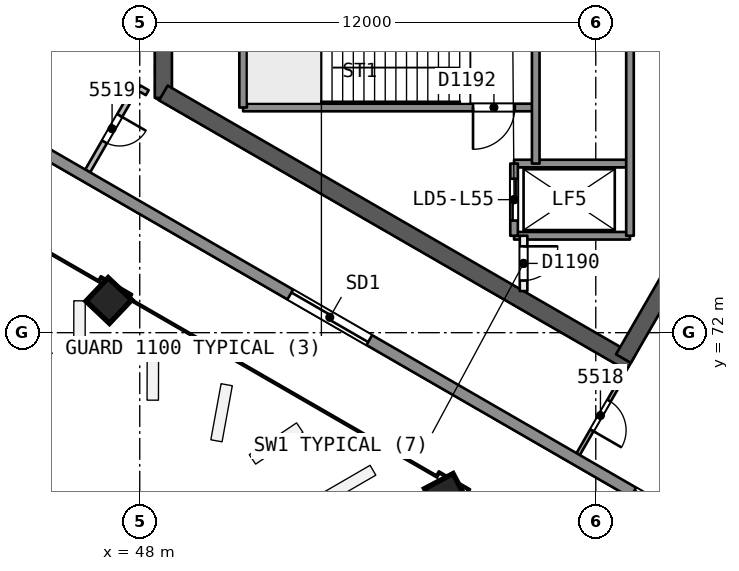
"""IFC4 building model, lengths in metres.
Left out: names, types, materials, properties, quantities, classifications, styles, units other than length and angle.
Written with IfcOpenShell. Run it as: python <this file> out.ifc"""

import sys

from ifc_helpers import new_model, si_unit, direction, frame, frame_2d, origin, origin_2d, place, context, subcontext, project, spatial, rectangle, extrude, element, fill, save


model = new_model("IFC4")
c1 = context("Model", 3, precision=1e-05, world=origin(), true_north=direction((0.0, 1.0)))
c2 = subcontext(c1, "Body", "Model", "MODEL_VIEW")
j1 = project(units=[si_unit("LENGTHUNIT", "METRE"), si_unit("PLANEANGLEUNIT", "RADIAN")], contexts=[c1])
p1 = place(None, origin())
s1 = spatial("IfcSite", under=j1, at=p1, CompositionType="ELEMENT")
p2 = place(p1, origin())
s2 = spatial("IfcBuilding", under=s1, at=p2, CompositionType="ELEMENT")
p3 = place(p2, frame((0.0, 0.0, 224.3)))
s3 = spatial("IfcBuildingStorey", under=s2, at=p3, CompositionType="ELEMENT", Elevation=224.3)
p4 = place(p3, frame((48.622, 81.693, 0.0), z_axis=(0.0, 0.0, 1.0), x_axis=(0.0, -1.0, 0.0)))
e1 = element("IfcWall", 1, at=p4, inside=s3, PredefinedType="SHEAR", context=c2, shape_type="SweptSolid", body=[
    extrude(rectangle(XDim=3.515, YDim=0.45, at=frame_2d((1.758, 0.0))), origin(), (0.0, 0.0, 1.0), 3.7),
])
p5 = place(p3, frame((48.622, 78.307, 0.0), z_axis=(0.0, 0.0, 1.0), x_axis=(0.86602701116, -0.499997215934, 0.0)))
e2 = element("IfcWall", 2, at=p5, inside=s3, PredefinedType="SHEAR", context=c2, shape_type="SweptSolid", body=[
    extrude(rectangle(XDim=14.204, YDim=0.45, at=frame_2d((7.102, 0.0))), origin(), (0.0, 0.0, 1.0), 3.7),
])
p6 = place(p3, frame((60.728, 71.318, 0.0), z_axis=(0.0, 0.0, 1.0), x_axis=(0.500012416173, 0.866018235185, 0.0)))
e3 = element("IfcWall", 3, at=p6, inside=s3, PredefinedType="SHEAR", context=c2, shape_type="SweptSolid", body=[
    extrude(rectangle(XDim=10.155, YDim=0.45, at=frame_2d((5.078, 0.0))), origin(), (0.0, 0.0, 1.0), 3.7),
])
p7 = place(p6, frame((8.005, 0.0, 0.0)))
e4 = element("IfcOpeningElement", 4, at=p7, cuts=e3, PredefinedType="OPENING", context=c2, shape_type="SweptSolid", body=[
    extrude(rectangle(XDim=1.2, YDim=2.1, at=frame_2d((0.6, 1.05))), frame((0.0, 0.235, 0.0), z_axis=(0.0, -1.0, 0.0), x_axis=(1.0, 0.0, 0.0)), (0.0, 0.0, 1.0), 0.471),
])
p8 = place(p3, frame((47.152, 72.837, 0.0), z_axis=(0.02855911485, 0.006793507689, 0.999569019734), x_axis=(-0.865318766308, 0.500768301983, 0.021319953197)))
e5 = element("IfcColumn", 5, at=p8, inside=s3, PredefinedType="COLUMN", context=c2, shape_type="SweptSolid", body=[
    extrude(rectangle(XDim=0.85, YDim=0.85, at=origin_2d()), origin(), (0.0, 0.0, 1.0), 3.702),
])
p9 = place(p3, frame((56.044, 67.703, 0.0), z_axis=(0.019328501455, 0.012204002625, 0.999738701537), x_axis=(-0.866909244433, 0.49835164734, 0.010676961654)))
e6 = element("IfcColumn", 6, at=p9, inside=s3, PredefinedType="COLUMN", context=c2, shape_type="SweptSolid", body=[
    extrude(rectangle(XDim=0.85, YDim=0.85, at=origin_2d()), origin(), (0.0, 0.0, 1.0), 3.701),
])
p10 = place(p3, frame((60.71, 70.838, 0.0), z_axis=(0.0, 0.0, 1.0), x_axis=(-0.499950341091, -0.86605407247, 0.0)))
e7 = element("IfcWall", 7, at=p10, inside=s3, PredefinedType="PARTITIONING", context=c2, shape_type="SweptSolid", body=[
    extrude(rectangle(XDim=2.349, YDim=0.1, at=frame_2d((1.175, 0.0))), origin(), (0.0, 0.0, 1.0), 3.3),
])
p11 = place(p10, frame((0.725, 0.0, 0.0)))
e8 = element("IfcOpeningElement", 8, at=p11, cuts=e7, PredefinedType="OPENING", context=c2, shape_type="SweptSolid", body=[
    extrude(rectangle(XDim=0.9, YDim=2.1, at=frame_2d((0.45, 1.05))), frame((0.0, 0.061, 0.0), z_axis=(0.0, -1.0, 0.0), x_axis=(1.0, 0.0, 0.0)), (0.0, 0.0, 1.0), 0.121),
])
p12 = place(p3, frame((48.198, 78.314, 0.0), z_axis=(0.0, 0.0, 1.0), x_axis=(-0.866054481515, 0.499949632511, 0.0)))
e9 = element("IfcWall", 9, at=p12, inside=s3, PredefinedType="PARTITIONING", context=c2, shape_type="SweptSolid", body=[
    extrude(rectangle(XDim=0.248, YDim=0.15, at=frame_2d((0.124, 0.0))), origin(), (0.0, 0.0, 1.0), 3.3),
])
p13 = place(p3, frame((47.914, 78.478, 0.0), z_axis=(0.0, 0.0, 1.0), x_axis=(-0.50000507078, -0.866022476149, 0.0)))
e10 = element("IfcWall", 10, at=p13, inside=s3, PredefinedType="PARTITIONING", context=c2, shape_type="SweptSolid", body=[
    extrude(rectangle(XDim=2.567, YDim=0.15, at=frame_2d((1.284, 0.0))), origin(), (0.0, 0.0, 1.0), 3.3),
])
p14 = place(p13, frame((0.884, 0.0, 0.0)))
e11 = element("IfcOpeningElement", 11, at=p14, cuts=e10, PredefinedType="OPENING", context=c2, shape_type="SweptSolid", body=[
    extrude(rectangle(XDim=0.8, YDim=2.1, at=frame_2d((0.4, 1.05))), frame((0.0, 0.085, 0.0), z_axis=(0.0, -1.0, 0.0), x_axis=(1.0, 0.0, 0.0)), (0.0, 0.0, 1.0), 0.171),
])
p15 = place(p3, frame((88.099, 52.141, 0.0), z_axis=(0.0, 0.0, 1.0), x_axis=(-0.86602584856, 0.499999229625, 0.0)))
e12 = element("IfcWall", 12, at=p15, inside=s3, PredefinedType="SOLIDWALL", context=c2, shape_type="SweptSolid", body=[
    extrude(rectangle(XDim=50.547, YDim=0.3, at=frame_2d((25.274, 0.0))), origin(), (0.0, 0.0, 1.0), 3.3),
])
p16 = place(p15, frame((23.294, 0.0, 0.0)))
e13 = element("IfcOpeningElement", 13, at=p16, cuts=e12, PredefinedType="OPENING", context=c2, shape_type="SweptSolid", body=[
    extrude(rectangle(XDim=2.4, YDim=2.4, at=frame_2d((1.2, 1.2))), frame((0.0, 0.161, 0.0), z_axis=(0.0, -1.0, 0.0), x_axis=(1.0, 0.0, 0.0)), (0.0, 0.0, 1.0), 0.321),
])
p17 = place(p15, frame((28.906, 0.0, 0.0)))
e14 = element("IfcOpeningElement", 14, at=p17, cuts=e12, PredefinedType="OPENING", context=c2, shape_type="SweptSolid", body=[
    extrude(rectangle(XDim=2.4, YDim=2.4, at=frame_2d((1.2, 1.2))), frame((0.0, 0.161, 0.0), z_axis=(0.0, -1.0, 0.0), x_axis=(1.0, 0.0, 0.0)), (0.0, 0.0, 1.0), 0.321),
])
p18 = place(p15, frame((39.328, 0.0, 0.0)))
e15 = element("IfcOpeningElement", 15, at=p18, cuts=e12, PredefinedType="OPENING", context=c2, shape_type="SweptSolid", body=[
    extrude(rectangle(XDim=2.4, YDim=2.4, at=frame_2d((1.2, 1.2))), frame((0.0, 0.161, 0.0), z_axis=(0.0, -1.0, 0.0), x_axis=(1.0, 0.0, 0.0)), (0.0, 0.0, 1.0), 0.321),
])
p19 = place(p15, frame((18.462, 0.0, 0.0)))
e16 = element("IfcOpeningElement", 16, at=p19, cuts=e12, PredefinedType="OPENING", context=c2, shape_type="SweptSolid", body=[
    extrude(rectangle(XDim=2.4, YDim=2.4, at=frame_2d((1.2, 1.2))), frame((0.0, 0.161, 0.0), z_axis=(0.0, -1.0, 0.0), x_axis=(1.0, 0.0, 0.0)), (0.0, 0.0, 1.0), 0.321),
])
p20 = place(p15, frame((8.771, 0.0, 0.0)))
e17 = element("IfcOpeningElement", 17, at=p20, cuts=e12, PredefinedType="OPENING", context=c2, shape_type="SweptSolid", body=[
    extrude(rectangle(XDim=2.4, YDim=2.4, at=frame_2d((1.2, 1.2))), frame((0.0, 0.161, 0.0), z_axis=(0.0, -1.0, 0.0), x_axis=(1.0, 0.0, 0.0)), (0.0, 0.0, 1.0), 0.321),
])
p21 = place(p3, frame((58.42, 77.925, 0.0), z_axis=(0.0, 0.0, 1.0), x_axis=(-1.0, 0.0, 0.0)))
e18 = element("IfcWall", 18, at=p21, inside=s3, PredefinedType="SOLIDWALL", context=c2, shape_type="SweptSolid", body=[
    extrude(rectangle(XDim=7.7, YDim=0.2, at=frame_2d((3.85, 0.0))), origin(), (0.0, 0.0, 1.0), 3.3),
])
p22 = place(p21, frame((0.55, 0.0, 0.0)))
e19 = element("IfcOpeningElement", 19, at=p22, cuts=e18, PredefinedType="OPENING", context=c2, shape_type="SweptSolid", body=[
    extrude(rectangle(XDim=1.1, YDim=2.1, at=frame_2d((0.55, 1.05))), frame((0.0, 0.11, 0.0), z_axis=(0.0, -1.0, 0.0), x_axis=(1.0, 0.0, 0.0)), (0.0, 0.0, 1.0), 0.221),
])
for number, where, z_axis, x_axis in (
    (20, (60.9, 76.45, 0.0), (0.0, 0.0, 1.0), (-1.0, 0.0, 0.0)),
    (21, (60.9, 74.55, 0.0), (0.0, 0.0, 1.0), (-1.0, 0.0, 0.0)),
):
    element("IfcWall", number, at=place(p3, frame(where, z_axis=z_axis, x_axis=x_axis)), inside=s3, PredefinedType="SOLIDWALL", context=c2, shape_type="SweptSolid", body=[
        extrude(rectangle(XDim=3.05, YDim=0.2, at=frame_2d((1.525, 0.0))), origin(), (0.0, 0.0, 1.0), 3.3),
    ])
p23 = place(p3, frame((60.9, 85.45, 0.0), z_axis=(0.0, 0.0, 1.0), x_axis=(0.0, -1.0, 0.0)))
e22 = element("IfcWall", 22, at=p23, inside=s3, PredefinedType="SOLIDWALL", context=c2, shape_type="SweptSolid", body=[
    extrude(rectangle(XDim=10.9, YDim=0.2, at=frame_2d((5.45, 0.0))), origin(), (0.0, 0.0, 1.0), 3.3),
])
p24 = place(p23, frame((4.0, 0.0, 0.0)))
e23 = element("IfcOpeningElement", 23, at=p24, cuts=e22, PredefinedType="OPENING", context=c2, shape_type="SweptSolid", body=[
    extrude(rectangle(XDim=1.0, YDim=2.1, at=frame_2d((0.5, 1.05))), frame((0.0, 0.11, 0.0), z_axis=(0.0, -1.0, 0.0), x_axis=(1.0, 0.0, 0.0)), (0.0, 0.0, 1.0), 0.221),
])
p25 = place(p3, frame((58.42, 87.09, 0.0), z_axis=(0.0, 0.0, 1.0), x_axis=(0.0, -1.0, 0.0)))
e24 = element("IfcWall", 24, at=p25, inside=s3, PredefinedType="SOLIDWALL", context=c2, shape_type="SweptSolid", body=[
    extrude(rectangle(XDim=10.64, YDim=0.2, at=frame_2d((5.32, 0.0))), origin(), (0.0, 0.0, 1.0), 3.3),
])
p26 = place(p25, frame((0.37, 0.0, 0.0)))
e25 = element("IfcOpeningElement", 25, at=p26, cuts=e24, PredefinedType="OPENING", context=c2, shape_type="SweptSolid", body=[
    extrude(rectangle(XDim=0.9, YDim=2.1, at=frame_2d((0.45, 1.05))), frame((0.0, 0.11, 0.0), z_axis=(0.0, -1.0, 0.0), x_axis=(1.0, 0.0, 0.0)), (0.0, 0.0, 1.0), 0.221),
])
p27 = place(p3, frame((58.1, 74.55, 0.0), z_axis=(0.0, 0.0, 1.0), x_axis=(0.0, -1.0, 0.0)))
e26 = element("IfcWall", 26, at=p27, inside=s3, PredefinedType="PARTITIONING", context=c2, shape_type="SweptSolid", body=[
    extrude(rectangle(XDim=1.455, YDim=0.2, at=frame_2d((0.728, 0.0))), origin(), (0.0, 0.0, 1.0), 3.3),
])
p28 = place(p27, frame((0.278, 0.0, 0.0)))
e27 = element("IfcOpeningElement", 27, at=p28, cuts=e26, PredefinedType="OPENING", context=c2, shape_type="SweptSolid", body=[
    extrude(rectangle(XDim=0.9, YDim=2.1, at=frame_2d((0.45, 1.05))), frame((0.0, 0.11, 0.0), z_axis=(0.0, -1.0, 0.0), x_axis=(1.0, 0.0, 0.0)), (0.0, 0.0, 1.0), 0.221),
])
p29 = place(p3, frame((57.85, 76.45, 0.0), z_axis=(0.0, 0.0, 1.0), x_axis=(0.0, -1.0, 0.0)))
e28 = element("IfcWall", 28, at=p29, inside=s3, PredefinedType="SOLIDWALL", context=c2, shape_type="SweptSolid", body=[
    extrude(rectangle(XDim=1.9, YDim=0.2, at=frame_2d((0.95, 0.0))), origin(), (0.0, 0.0, 1.0), 3.3),
])
p30 = place(p29, frame((0.4, 0.0, 0.0)))
e29 = element("IfcOpeningElement", 29, at=p30, cuts=e28, PredefinedType="OPENING", context=c2, shape_type="SweptSolid", body=[
    extrude(rectangle(XDim=1.1, YDim=2.1, at=frame_2d((0.55, 1.05))), frame((0.0, 0.11, 0.0), z_axis=(0.0, -1.0, 0.0), x_axis=(1.0, 0.0, 0.0)), (0.0, 0.0, 1.0), 0.221),
])
p31 = place(p3, frame((50.72, 82.075, 0.0), z_axis=(0.0, 0.0, 1.0), x_axis=(0.0, -1.0, 0.0)))
e30 = element("IfcWall", 30, at=p31, inside=s3, PredefinedType="SOLIDWALL", context=c2, shape_type="SweptSolid", body=[
    extrude(rectangle(XDim=4.15, YDim=0.2, at=frame_2d((2.075, 0.0))), origin(), (0.0, 0.0, 1.0), 3.3),
])
p32 = place(p11, origin())
e31 = element("IfcDoor", 31, at=p32, inside=s3, OperationType="SINGLE_SWING_RIGHT", PredefinedType="NOTDEFINED", context=c2, shape_type="SweptSolid", body=[
    extrude(rectangle(XDim=0.9, YDim=2.1, at=frame_2d((0.45, 1.05))), frame((0.0, 0.025, 0.0), z_axis=(0.0, -1.0, 0.0), x_axis=(1.0, 0.0, 0.0)), (0.0, 0.0, 1.0), 0.05),
])
fill(e8, e31)
p33 = place(p14, origin())
e32 = element("IfcDoor", 32, at=p33, inside=s3, OperationType="SINGLE_SWING_LEFT", PredefinedType="NOTDEFINED", context=c2, shape_type="SweptSolid", body=[
    extrude(rectangle(XDim=0.8, YDim=2.1, at=frame_2d((0.4, 1.05))), frame((0.0, 0.025, 0.0), z_axis=(0.0, -1.0, 0.0), x_axis=(1.0, 0.0, 0.0)), (0.0, 0.0, 1.0), 0.05),
])
fill(e11, e32)
p34 = place(p18, origin())
e33 = element("IfcDoor", 33, at=p34, inside=s3, OperationType="SLIDING_TO_LEFT", PredefinedType="NOTDEFINED", context=c2, shape_type="SweptSolid", body=[
    extrude(rectangle(XDim=2.4, YDim=2.4, at=frame_2d((1.2, 1.2))), frame((0.0, 0.025, 0.0), z_axis=(0.0, -1.0, 0.0), x_axis=(1.0, 0.0, 0.0)), (0.0, 0.0, 1.0), 0.05),
])
fill(e15, e33)
p35 = place(p30, origin())
e34 = element("IfcDoor", 34, at=p35, inside=s3, OperationType="SLIDING_TO_RIGHT", PredefinedType="NOTDEFINED", context=c2, shape_type="SweptSolid", body=[
    extrude(rectangle(XDim=1.1, YDim=2.1, at=frame_2d((0.55, 1.05))), frame((0.0, 0.025, 0.0), z_axis=(0.0, -1.0, 0.0), x_axis=(1.0, 0.0, 0.0)), (0.0, 0.0, 1.0), 0.05),
])
fill(e29, e34)
p36 = place(p28, origin())
e35 = element("IfcDoor", 35, at=p36, inside=s3, OperationType="SINGLE_SWING_LEFT", PredefinedType="NOTDEFINED", context=c2, shape_type="SweptSolid", body=[
    extrude(rectangle(XDim=0.9, YDim=2.1, at=frame_2d((0.45, 1.05))), frame((0.0, 0.025, 0.0), z_axis=(0.0, -1.0, 0.0), x_axis=(1.0, 0.0, 0.0)), (0.0, 0.0, 1.0), 0.05),
])
fill(e27, e35)
p37 = place(p22, origin())
e36 = element("IfcDoor", 36, at=p37, inside=s3, OperationType="SINGLE_SWING_RIGHT", PredefinedType="NOTDEFINED", context=c2, shape_type="SweptSolid", body=[
    extrude(rectangle(XDim=1.1, YDim=2.1, at=frame_2d((0.55, 1.05))), frame((0.0, 0.025, 0.0), z_axis=(0.0, -1.0, 0.0), x_axis=(1.0, 0.0, 0.0)), (0.0, 0.0, 1.0), 0.05),
])
fill(e19, e36)
save(model, sys.argv[1])
